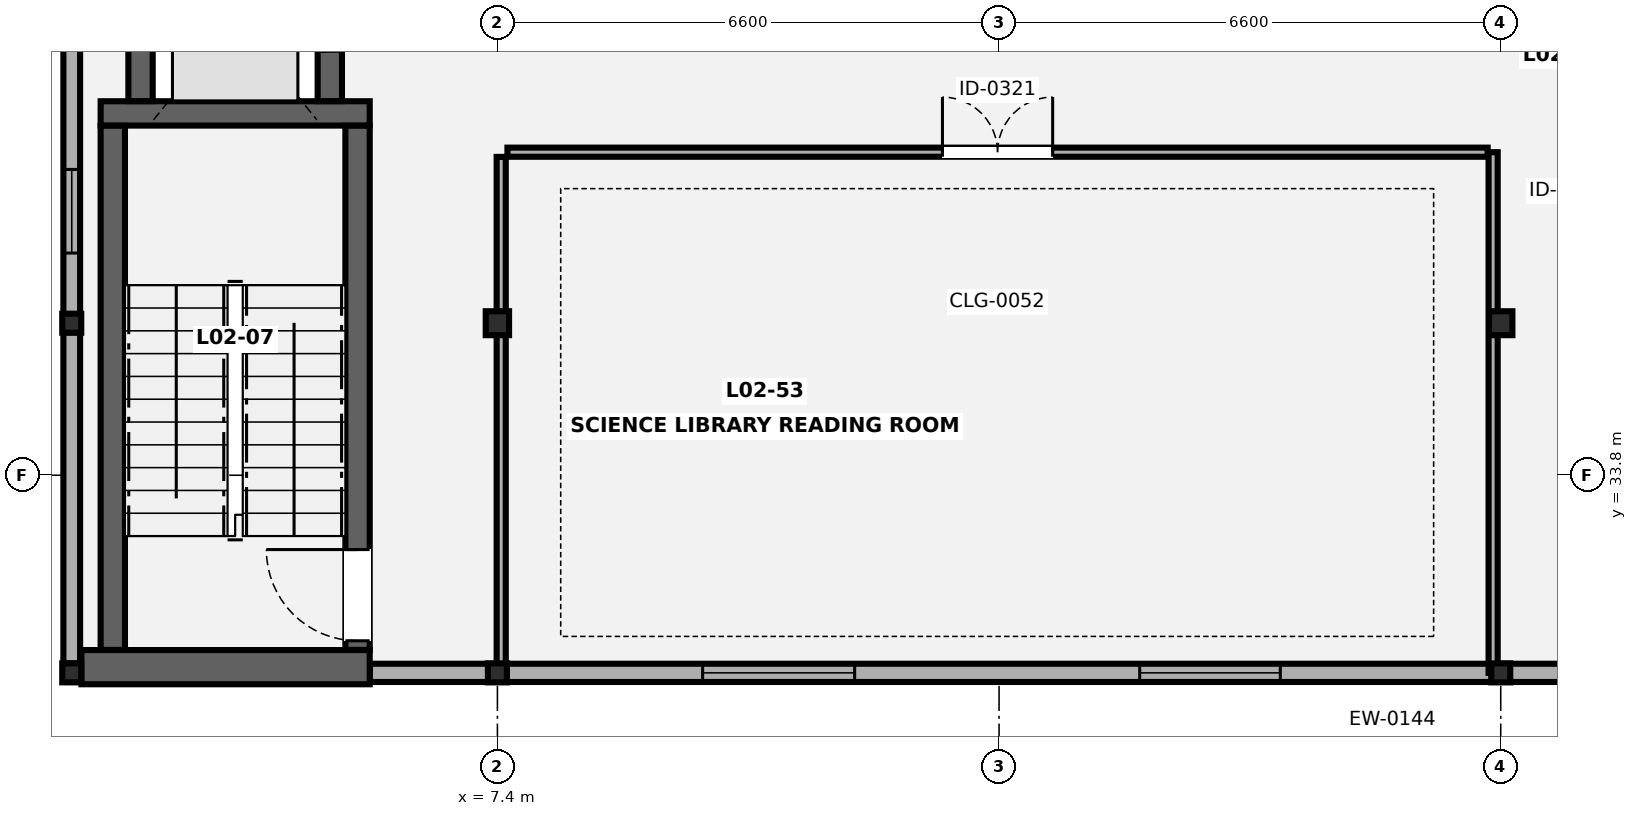
"""IFC4 building model, lengths in metres.
Left out: names, types, materials, properties, quantities, classifications, styles, units other than length and angle.
Written with IfcOpenShell. Run it as: python <this file> out.ifc"""

import sys

from ifc_helpers import new_model, si_unit, direction, frame, frame_2d, origin, origin_2d, place, context, subcontext, project, spatial, rectangle, hollow_rectangle, i_section, extrude, element, fill, save


model = new_model("IFC4")
c1 = context("Model", 3, precision=1e-05, world=origin(), true_north=direction((0.0, 1.0)))
c2 = subcontext(c1, "Body", "Model", "MODEL_VIEW")
j1 = project(units=[si_unit("LENGTHUNIT", "METRE"), si_unit("PLANEANGLEUNIT", "RADIAN")], contexts=[c1])
p1 = place(None, origin())
s1 = spatial("IfcSite", under=j1, at=p1, CompositionType="ELEMENT")
p2 = place(p1, origin())
s2 = spatial("IfcBuilding", under=s1, at=p2, CompositionType="ELEMENT")
p3 = place(p2, frame((0.0, 0.0, 9.1)))
s3 = spatial("IfcBuildingStorey", under=s2, at=p3, CompositionType="ELEMENT", Elevation=9.1)
for number, where, z_axis, x_axis in (
    (1, (1.8, 31.2, 0.0), (0.0, 0.0, 1.0), (1.0, 0.0, 0.0)),
    (2, (1.8, 35.8, 0.0), (0.0, 0.0, 1.0), (1.0, 0.0, 0.0)),
    (3, (7.4, 31.2, 0.0), (0.0, 0.0, 1.0), (1.0, 0.0, 0.0)),
):
    element("IfcColumn", number, at=place(p3, frame(where, z_axis=z_axis, x_axis=x_axis)), inside=s3, PredefinedType="COLUMN", context=c2, shape_type="SweptSolid", body=[
        extrude(hollow_rectangle(XDim=0.25, YDim=0.25, WallThickness=0.012, at=origin_2d()), origin(), (0.0, 0.0, 1.0), 4.2),
    ])
p4 = place(p3, frame((7.4, 35.8, 0.0), z_axis=(0.0, 0.0, 1.0), x_axis=(1.0, 0.0, 0.0)))
e4 = element("IfcColumn", 4, at=p4, inside=s3, PredefinedType="COLUMN", context=c2, shape_type="SweptSolid", body=[
    extrude(i_section(OverallWidth=0.307, OverallDepth=0.315, WebThickness=0.012, FlangeThickness=0.019, FilletRadius=0.017, at=origin_2d()), origin(), (0.0, 0.0, 1.0), 4.2),
])
p5 = place(p3, frame((20.6, 31.2, 0.0), z_axis=(0.0, 0.0, 1.0), x_axis=(1.0, 0.0, 0.0)))
e5 = element("IfcColumn", 5, at=p5, inside=s3, PredefinedType="COLUMN", context=c2, shape_type="SweptSolid", body=[
    extrude(hollow_rectangle(XDim=0.25, YDim=0.25, WallThickness=0.012, at=origin_2d()), origin(), (0.0, 0.0, 1.0), 4.2),
])
p6 = place(p3, frame((20.6, 35.8, 0.0), z_axis=(0.0, 0.0, 1.0), x_axis=(1.0, 0.0, 0.0)))
e6 = element("IfcColumn", 6, at=p6, inside=s3, PredefinedType="COLUMN", context=c2, shape_type="SweptSolid", body=[
    extrude(i_section(OverallWidth=0.307, OverallDepth=0.315, WebThickness=0.012, FlangeThickness=0.019, FilletRadius=0.017, at=origin_2d()), origin(), (0.0, 0.0, 1.0), 4.2),
])
p7 = place(p3, frame((1.8, 31.323, 0.0), z_axis=(0.0, 0.0, 1.0), x_axis=(0.0, 1.0, 0.0)))
e7 = element("IfcWall", 7, at=p7, inside=s3, PredefinedType="SOLIDWALL", context=c2, shape_type="SweptSolid", body=[
    extrude(rectangle(XDim=8.954, YDim=0.22, at=frame_2d((4.477, 0.0))), origin(), (0.0, 0.0, 1.0), 3.445),
])
p8 = place(p7, frame((5.4, 0.0, 0.85)))
e8 = element("IfcOpeningElement", 8, at=p8, cuts=e7, PredefinedType="OPENING", context=c2, shape_type="SweptSolid", body=[
    extrude(rectangle(XDim=1.1, YDim=1.4, at=frame_2d((0.55, 0.7))), frame((0.0, 0.12, 0.0), z_axis=(0.0, -1.0, 0.0), x_axis=(1.0, 0.0, 0.0)), (0.0, 0.0, 1.0), 0.24),
])
p9 = place(p3, frame((27.077, 31.2, 0.0), z_axis=(0.0, 0.0, 1.0), x_axis=(-1.0, 0.0, 0.0)))
e9 = element("IfcWall", 9, at=p9, inside=s3, PredefinedType="SOLIDWALL", context=c2, shape_type="SweptSolid", body=[
    extrude(rectangle(XDim=21.355, YDim=0.24, at=frame_2d((10.677, 0.0))), origin(), (0.0, 0.0, 1.0), 3.505),
])
p10 = place(p9, frame((9.377, 0.0, 0.85)))
e10 = element("IfcOpeningElement", 10, at=p10, cuts=e9, PredefinedType="OPENING", context=c2, shape_type="SweptSolid", body=[
    extrude(rectangle(XDim=1.85, YDim=1.4, at=frame_2d((0.925, 0.7))), frame((0.0, 0.13, 0.0), z_axis=(0.0, -1.0, 0.0), x_axis=(1.0, 0.0, 0.0)), (0.0, 0.0, 1.0), 0.26),
])
p11 = place(p9, frame((14.977, 0.0, 0.85)))
e11 = element("IfcOpeningElement", 11, at=p11, cuts=e9, PredefinedType="OPENING", context=c2, shape_type="SweptSolid", body=[
    extrude(rectangle(XDim=2.0, YDim=1.4, at=frame_2d((1.0, 0.7))), frame((0.0, 0.13, 0.0), z_axis=(0.0, -1.0, 0.0), x_axis=(1.0, 0.0, 0.0)), (0.0, 0.0, 1.0), 0.26),
])
p12 = place(p3, frame((1.927, 31.275, 0.0), z_axis=(0.0, 0.0, 1.0), x_axis=(1.0, 0.0, 0.0)))
e12 = element("IfcWall", 12, at=p12, inside=s3, PredefinedType="SHEAR", context=c2, shape_type="SweptSolid", body=[
    extrude(rectangle(XDim=3.793, YDim=0.45, at=frame_2d((1.896, 0.0))), origin(), (0.0, 0.0, 1.0), 4.0),
])
p13 = place(p3, frame((2.18, 38.56, 0.0), z_axis=(0.0, 0.0, 1.0), x_axis=(1.0, 0.0, 0.0)))
e13 = element("IfcWall", 13, at=p13, inside=s3, PredefinedType="SHEAR", context=c2, shape_type="SweptSolid", body=[
    extrude(rectangle(XDim=3.54, YDim=0.32, at=frame_2d((1.77, 0.0))), origin(), (0.0, 0.0, 1.0), 4.0),
])
p14 = place(p3, frame((2.34, 31.502, 0.0), z_axis=(0.0, 0.0, 1.0), x_axis=(0.0, 1.0, 0.0)))
e14 = element("IfcWall", 14, at=p14, inside=s3, PredefinedType="SHEAR", context=c2, shape_type="SweptSolid", body=[
    extrude(rectangle(XDim=6.896, YDim=0.32, at=frame_2d((3.448, 0.0))), origin(), (0.0, 0.0, 1.0), 4.0),
])
p15 = place(p3, frame((5.56, 31.502, 0.0), z_axis=(0.0, 0.0, 1.0), x_axis=(0.0, 1.0, 0.0)))
e15 = element("IfcWall", 15, at=p15, inside=s3, PredefinedType="SHEAR", context=c2, shape_type="SweptSolid", body=[
    extrude(rectangle(XDim=6.896, YDim=0.32, at=frame_2d((3.448, 0.0))), origin(), (0.0, 0.0, 1.0), 4.0),
])
p16 = place(p15, frame((0.12, 0.0, 0.0)))
e16 = element("IfcOpeningElement", 16, at=p16, cuts=e15, PredefinedType="OPENING", context=c2, shape_type="SweptSolid", body=[
    extrude(rectangle(XDim=1.2, YDim=2.15, at=frame_2d((0.6, 1.075))), frame((0.0, 0.17, 0.0), z_axis=(0.0, -1.0, 0.0), x_axis=(1.0, 0.0, 0.0)), (0.0, 0.0, 1.0), 0.34),
])
p17 = place(p3, frame((2.705, 38.722, 0.0), z_axis=(0.0, 0.0, 1.0), x_axis=(0.0, 1.0, 0.0)))
e17 = element("IfcWall", 17, at=p17, inside=s3, PredefinedType="SHEAR", context=c2, shape_type="SweptSolid", body=[
    extrude(rectangle(XDim=2.411, YDim=0.32, at=frame_2d((1.206, 0.0))), origin(), (0.0, 0.0, 1.0), 4.0),
])
p18 = place(p3, frame((5.195, 38.722, 0.0), z_axis=(0.0, 0.0, 1.0), x_axis=(0.0, 1.0, 0.0)))
e18 = element("IfcWall", 18, at=p18, inside=s3, PredefinedType="SHEAR", context=c2, shape_type="SweptSolid", body=[
    extrude(rectangle(XDim=2.411, YDim=0.32, at=frame_2d((1.206, 0.0))), origin(), (0.0, 0.0, 1.0), 4.0),
])
p19 = place(p18, frame((0.656, 0.0, 0.0)))
e19 = element("IfcOpeningElement", 19, at=p19, cuts=e18, PredefinedType="OPENING", context=c2, shape_type="SweptSolid", body=[
    extrude(rectangle(XDim=1.1, YDim=2.15, at=frame_2d((0.55, 1.075))), frame((0.0, 0.17, 0.0), z_axis=(0.0, -1.0, 0.0), x_axis=(1.0, 0.0, 0.0)), (0.0, 0.0, 1.0), 0.34),
])
p20 = place(p3, frame((7.532, 38.05, 0.0), z_axis=(0.0, 0.0, 1.0), x_axis=(1.0, 0.0, 0.0)))
e20 = element("IfcWall", 20, at=p20, inside=s3, PredefinedType="PARTITIONING", context=c2, shape_type="SweptSolid", body=[
    extrude(rectangle(XDim=12.896, YDim=0.12, at=frame_2d((6.448, 0.0))), origin(), (0.0, 0.0, 1.0), 3.598),
])
p21 = place(p20, frame((5.723, 0.0, 0.0)))
e21 = element("IfcOpeningElement", 21, at=p21, cuts=e20, PredefinedType="OPENING", context=c2, shape_type="SweptSolid", body=[
    extrude(rectangle(XDim=1.45, YDim=2.12, at=frame_2d((0.725, 1.06))), frame((0.0, 0.07, 0.0), z_axis=(0.0, -1.0, 0.0), x_axis=(1.0, 0.0, 0.0)), (0.0, 0.0, 1.0), 0.14),
])
p22 = place(p3, frame((7.45, 31.2, 0.0), z_axis=(0.0, 0.0, 1.0), x_axis=(0.0, 1.0, 0.0)))
e22 = element("IfcWall", 22, at=p22, inside=s3, PredefinedType="PARTITIONING", context=c2, shape_type="SweptSolid", body=[
    extrude(rectangle(XDim=6.788, YDim=0.12, at=frame_2d((3.394, 0.0))), origin(), (0.0, 0.0, 1.0), 3.445),
])
p23 = place(p3, frame((20.5, 31.2, 0.0), z_axis=(0.0, 0.0, 1.0), x_axis=(0.0, 1.0, 0.0)))
e23 = element("IfcWall", 23, at=p23, inside=s3, PredefinedType="PARTITIONING", context=c2, shape_type="SweptSolid", body=[
    extrude(rectangle(XDim=6.85, YDim=0.12, at=frame_2d((3.425, 0.0))), origin(), (0.0, 0.0, 1.0), 3.445),
])
p24 = place(p8, origin())
e24 = element("IfcWindow", 24, at=p24, inside=s3, PartitioningType="SINGLE_PANEL", PredefinedType="WINDOW", context=c2, shape_type="SweptSolid", body=[
    extrude(rectangle(XDim=1.1, YDim=1.4, at=frame_2d((0.55, 0.7))), frame((0.0, 0.03, 0.0), z_axis=(0.0, -1.0, 0.0), x_axis=(1.0, 0.0, 0.0)), (0.0, 0.0, 1.0), 0.06),
])
fill(e8, e24)
p25 = place(p10, origin())
e25 = element("IfcWindow", 25, at=p25, inside=s3, PartitioningType="SINGLE_PANEL", PredefinedType="WINDOW", context=c2, shape_type="SweptSolid", body=[
    extrude(rectangle(XDim=1.85, YDim=1.4, at=frame_2d((0.925, 0.7))), frame((0.0, 0.03, 0.0), z_axis=(0.0, -1.0, 0.0), x_axis=(1.0, 0.0, 0.0)), (0.0, 0.0, 1.0), 0.06),
])
fill(e10, e25)
p26 = place(p11, origin())
e26 = element("IfcWindow", 26, at=p26, inside=s3, PartitioningType="SINGLE_PANEL", PredefinedType="WINDOW", context=c2, shape_type="SweptSolid", body=[
    extrude(rectangle(XDim=2.0, YDim=1.4, at=frame_2d((1.0, 0.7))), frame((0.0, 0.03, 0.0), z_axis=(0.0, -1.0, 0.0), x_axis=(1.0, 0.0, 0.0)), (0.0, 0.0, 1.0), 0.06),
])
fill(e11, e26)
p27 = place(p16, origin())
e27 = element("IfcDoor", 27, at=p27, inside=s3, OperationType="SINGLE_SWING_RIGHT", PredefinedType="DOOR", context=c2, shape_type="SweptSolid", body=[
    extrude(rectangle(XDim=1.2, YDim=2.15, at=frame_2d((0.6, 1.075))), frame((0.0, 0.025, 0.0), z_axis=(0.0, -1.0, 0.0), x_axis=(1.0, 0.0, 0.0)), (0.0, 0.0, 1.0), 0.05),
])
fill(e16, e27)
p28 = place(p21, origin())
e28 = element("IfcDoor", 28, at=p28, inside=s3, OperationType="DOUBLE_DOOR_SINGLE_SWING", PredefinedType="DOOR", context=c2, shape_type="SweptSolid", body=[
    extrude(rectangle(XDim=1.45, YDim=2.12, at=frame_2d((0.725, 1.06))), frame((0.0, 0.025, 0.0), z_axis=(0.0, -1.0, 0.0), x_axis=(1.0, 0.0, 0.0)), (0.0, 0.0, 1.0), 0.05),
])
fill(e21, e28)
save(model, sys.argv[1])
